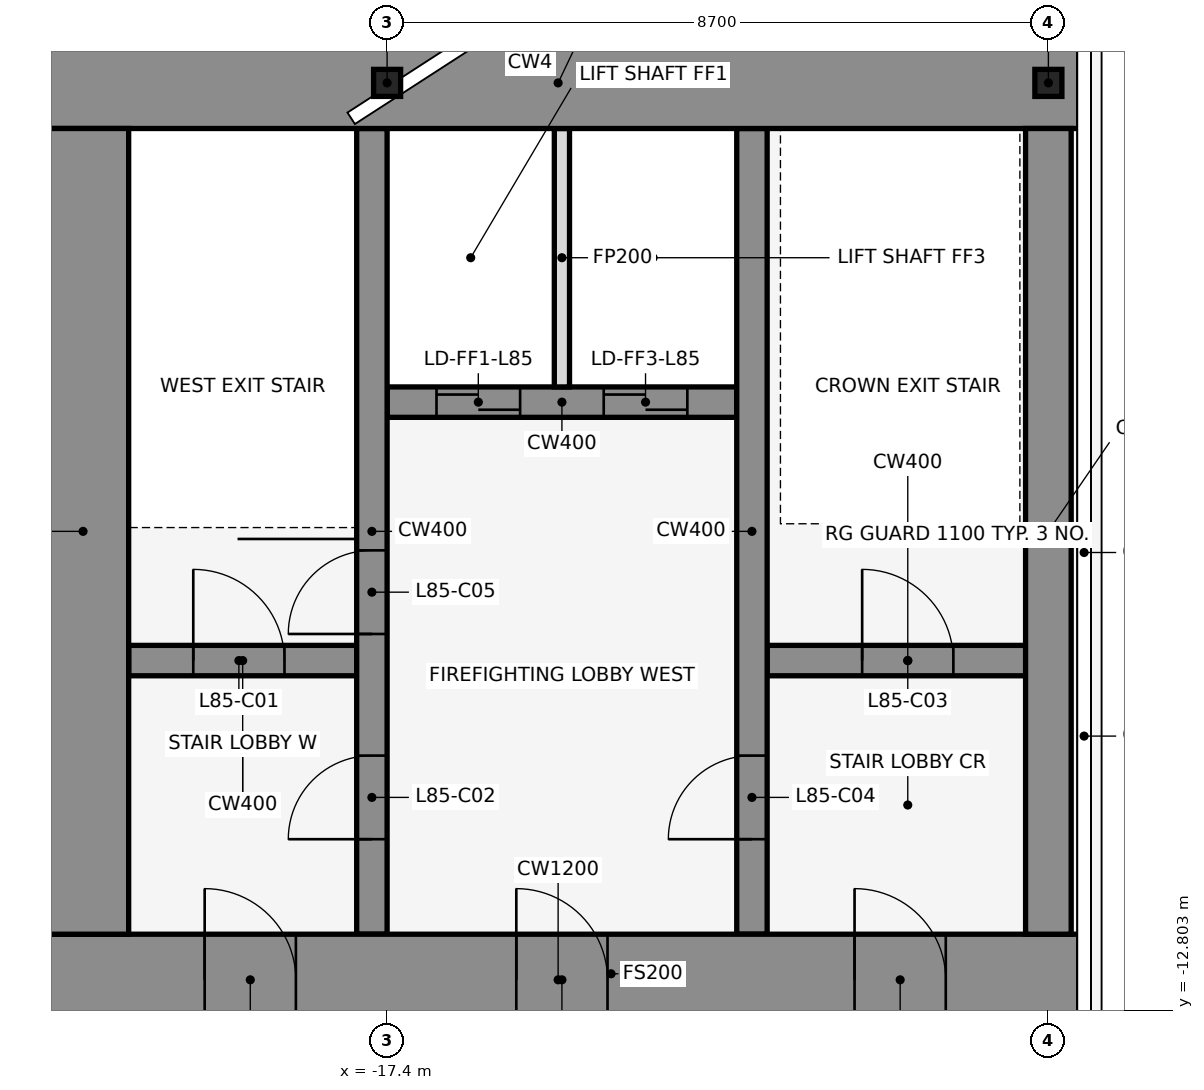
"""IFC4 building model, lengths in metres.
Left out: names, types, materials, properties, quantities, classifications, styles, units other than length and angle.
Written with IfcOpenShell. Run it as: python <this file> out.ifc"""

import sys

from ifc_helpers import new_model, si_unit, direction, frame, frame_2d, origin, origin_2d, place, context, subcontext, project, spatial, rectangle, hollow_rectangle, extrude, element, fill, save


model = new_model("IFC4")
c1 = context("Model", 3, precision=1e-05, world=origin(), true_north=direction((0.0, 1.0)))
c2 = subcontext(c1, "Body", "Model", "MODEL_VIEW")
j1 = project(units=[si_unit("LENGTHUNIT", "METRE"), si_unit("PLANEANGLEUNIT", "RADIAN")], contexts=[c1])
p1 = place(None, origin())
s1 = spatial("IfcSite", under=j1, at=p1, CompositionType="ELEMENT")
p2 = place(p1, origin())
s2 = spatial("IfcBuilding", under=s1, at=p2, CompositionType="ELEMENT")
p3 = place(p2, frame((0.0, 0.0, 379.4)))
s3 = spatial("IfcBuildingStorey", under=s2, at=p3, CompositionType="ELEMENT", Elevation=379.4)
p4 = place(p3, frame((-17.4, -0.6, 4.5), z_axis=(0.0, 0.0, 1.0), x_axis=(1.0, 0.0, 0.0)))
e1 = element("IfcColumn", 1, at=p4, inside=s3, PredefinedType="COLUMN", context=c2, shape_type="SweptSolid", body=[
    extrude(hollow_rectangle(XDim=0.356, YDim=0.356, WallThickness=0.012, at=origin_2d()), origin(), (0.0, 0.0, 1.0), 2.624),
])
p5 = place(p3, frame((-8.7, -0.6, 4.5), z_axis=(0.0, 0.0, 1.0), x_axis=(1.0, 0.0, 0.0)))
e2 = element("IfcColumn", 2, at=p5, inside=s3, PredefinedType="COLUMN", context=c2, shape_type="SweptSolid", body=[
    extrude(hollow_rectangle(XDim=0.356, YDim=0.356, WallThickness=0.012, at=origin_2d()), origin(), (0.0, 0.0, 1.0), 2.816),
])
p6 = place(p3, frame((-20.8, -8.2, 0.0), z_axis=(0.0, 0.0, 1.0), x_axis=(1.0, 0.0, 0.0)))
e3 = element("IfcWall", 3, at=p6, inside=s3, PredefinedType="SHEAR", context=c2, shape_type="SweptSolid", body=[
    extrude(rectangle(XDim=3.0, YDim=0.4, at=frame_2d((1.5, 0.0))), origin(), (0.0, 0.0, 1.0), 4.5),
])
p7 = place(p6, frame((0.85, 0.0, 0.0)))
e4 = element("IfcOpeningElement", 4, at=p7, cuts=e3, PredefinedType="OPENING", context=c2, shape_type="SweptSolid", body=[
    extrude(rectangle(XDim=1.2, YDim=2.1, at=frame_2d((0.6, 1.05))), frame((0.0, 0.212, 0.0), z_axis=(0.0, -1.0, 0.0), x_axis=(1.0, 0.0, 0.0)), (0.0, 0.0, 1.0), 0.424),
])
p8 = place(p3, frame((-12.4, -8.2, 0.0), z_axis=(0.0, 0.0, 1.0), x_axis=(1.0, 0.0, 0.0)))
e5 = element("IfcWall", 5, at=p8, inside=s3, PredefinedType="SHEAR", context=c2, shape_type="SweptSolid", body=[
    extrude(rectangle(XDim=3.7, YDim=0.4, at=frame_2d((1.85, 0.0))), origin(), (0.0, 0.0, 1.0), 4.5),
])
p9 = place(p8, frame((1.25, 0.0, 0.0)))
e6 = element("IfcOpeningElement", 6, at=p9, cuts=e5, PredefinedType="OPENING", context=c2, shape_type="SweptSolid", body=[
    extrude(rectangle(XDim=1.2, YDim=2.1, at=frame_2d((0.6, 1.05))), frame((0.0, 0.212, 0.0), z_axis=(0.0, -1.0, 0.0), x_axis=(1.0, 0.0, 0.0)), (0.0, 0.0, 1.0), 0.424),
])
p10 = place(p3, frame((-17.4, -4.8, 0.0), z_axis=(0.0, 0.0, 1.0), x_axis=(1.0, 0.0, 0.0)))
e7 = element("IfcWall", 7, at=p10, inside=s3, PredefinedType="SHEAR", context=c2, shape_type="SweptSolid", body=[
    extrude(rectangle(XDim=4.6, YDim=0.4, at=frame_2d((2.3, 0.0))), origin(), (0.0, 0.0, 1.0), 4.5),
])
p11 = place(p10, frame((0.65, 0.0, 0.0)))
e8 = element("IfcOpeningElement", 8, at=p11, cuts=e7, PredefinedType="OPENING", context=c2, shape_type="SweptSolid", body=[
    extrude(rectangle(XDim=1.1, YDim=2.1, at=frame_2d((0.55, 1.05))), frame((0.0, 0.212, 0.0), z_axis=(0.0, -1.0, 0.0), x_axis=(1.0, 0.0, 0.0)), (0.0, 0.0, 1.0), 0.424),
])
p12 = place(p10, frame((2.85, 0.0, 0.0)))
e9 = element("IfcOpeningElement", 9, at=p12, cuts=e7, PredefinedType="OPENING", context=c2, shape_type="SweptSolid", body=[
    extrude(rectangle(XDim=1.1, YDim=2.1, at=frame_2d((0.55, 1.05))), frame((0.0, 0.212, 0.0), z_axis=(0.0, -1.0, 0.0), x_axis=(1.0, 0.0, 0.0)), (0.0, 0.0, 1.0), 0.424),
])
p13 = place(p3, frame((-17.6, -11.8, 0.0), z_axis=(0.0, 0.0, 1.0), x_axis=(0.0, 1.0, 0.0)))
e10 = element("IfcWall", 10, at=p13, inside=s3, PredefinedType="SHEAR", context=c2, shape_type="SweptSolid", body=[
    extrude(rectangle(XDim=10.6, YDim=0.4, at=frame_2d((5.3, 0.0))), origin(), (0.0, 0.0, 1.0), 4.5),
])
p14 = place(p13, frame((1.25, 0.0, 0.0)))
e11 = element("IfcOpeningElement", 11, at=p14, cuts=e10, PredefinedType="OPENING", context=c2, shape_type="SweptSolid", body=[
    extrude(rectangle(XDim=1.1, YDim=2.1, at=frame_2d((0.55, 1.05))), frame((0.0, 0.212, 0.0), z_axis=(0.0, -1.0, 0.0), x_axis=(1.0, 0.0, 0.0)), (0.0, 0.0, 1.0), 0.424),
])
p15 = place(p13, frame((3.95, 0.0, 0.0)))
e12 = element("IfcOpeningElement", 12, at=p15, cuts=e10, PredefinedType="OPENING", context=c2, shape_type="SweptSolid", body=[
    extrude(rectangle(XDim=1.1, YDim=2.1, at=frame_2d((0.55, 1.05))), frame((0.0, 0.212, 0.0), z_axis=(0.0, -1.0, 0.0), x_axis=(1.0, 0.0, 0.0)), (0.0, 0.0, 1.0), 0.424),
])
p16 = place(p3, frame((-15.1, -4.6, 0.0), z_axis=(0.0, 0.0, 1.0), x_axis=(0.0, 1.0, 0.0)))
e13 = element("IfcWall", 13, at=p16, inside=s3, PredefinedType="PARTITIONING", context=c2, shape_type="SweptSolid", body=[
    extrude(rectangle(XDim=3.4, YDim=0.2, at=frame_2d((1.7, 0.0))), origin(), (0.0, 0.0, 1.0), 3.78),
])
p17 = place(p3, frame((-12.6, -11.8, 0.0), z_axis=(0.0, 0.0, 1.0), x_axis=(0.0, 1.0, 0.0)))
e14 = element("IfcWall", 14, at=p17, inside=s3, PredefinedType="SHEAR", context=c2, shape_type="SweptSolid", body=[
    extrude(rectangle(XDim=10.6, YDim=0.4, at=frame_2d((5.3, 0.0))), origin(), (0.0, 0.0, 1.0), 4.5),
])
p18 = place(p17, frame((1.25, 0.0, 0.0)))
e15 = element("IfcOpeningElement", 15, at=p18, cuts=e14, PredefinedType="OPENING", context=c2, shape_type="SweptSolid", body=[
    extrude(rectangle(XDim=1.1, YDim=2.1, at=frame_2d((0.55, 1.05))), frame((0.0, 0.212, 0.0), z_axis=(0.0, -1.0, 0.0), x_axis=(1.0, 0.0, 0.0)), (0.0, 0.0, 1.0), 0.424),
])
p19 = place(p3, frame((-22.0, -0.6, 0.0), z_axis=(0.0, 0.0, 1.0), x_axis=(1.0, 0.0, 0.0)))
e16 = element("IfcWall", 16, at=p19, inside=s3, PredefinedType="SHEAR", context=c2, shape_type="SweptSolid", body=[
    extrude(rectangle(XDim=13.7, YDim=1.2, at=frame_2d((6.85, 0.0))), origin(), (0.0, 0.0, 1.0), 4.5),
])
p20 = place(p3, frame((-22.0, -12.4, 0.0), z_axis=(0.0, 0.0, 1.0), x_axis=(1.0, 0.0, 0.0)))
e17 = element("IfcWall", 17, at=p20, inside=s3, PredefinedType="SHEAR", context=c2, shape_type="SweptSolid", body=[
    extrude(rectangle(XDim=13.7, YDim=1.2, at=frame_2d((6.85, 0.0))), origin(), (0.0, 0.0, 1.0), 4.5),
])
p21 = place(p20, frame((2.2, 0.0, 0.0)))
e18 = element("IfcOpeningElement", 18, at=p21, cuts=e17, PredefinedType="OPENING", context=c2, shape_type="SweptSolid", body=[
    extrude(rectangle(XDim=1.2, YDim=2.1, at=frame_2d((0.6, 1.05))), frame((0.0, 0.612, 0.0), z_axis=(0.0, -1.0, 0.0), x_axis=(1.0, 0.0, 0.0)), (0.0, 0.0, 1.0), 1.224),
])
p22 = place(p20, frame((10.75, 0.0, 0.0)))
e19 = element("IfcOpeningElement", 19, at=p22, cuts=e17, PredefinedType="OPENING", context=c2, shape_type="SweptSolid", body=[
    extrude(rectangle(XDim=1.2, YDim=2.1, at=frame_2d((0.6, 1.05))), frame((0.0, 0.612, 0.0), z_axis=(0.0, -1.0, 0.0), x_axis=(1.0, 0.0, 0.0)), (0.0, 0.0, 1.0), 1.224),
])
p23 = place(p20, frame((6.3, 0.0, 0.0)))
e20 = element("IfcOpeningElement", 20, at=p23, cuts=e17, PredefinedType="OPENING", context=c2, shape_type="SweptSolid", body=[
    extrude(rectangle(XDim=1.2, YDim=2.1, at=frame_2d((0.6, 1.05))), frame((0.0, 0.612, 0.0), z_axis=(0.0, -1.0, 0.0), x_axis=(1.0, 0.0, 0.0)), (0.0, 0.0, 1.0), 1.224),
])
p24 = place(p3, frame((-21.4, -11.8, 0.0), z_axis=(0.0, 0.0, 1.0), x_axis=(0.0, 1.0, 0.0)))
e21 = element("IfcWall", 21, at=p24, inside=s3, PredefinedType="SHEAR", context=c2, shape_type="SweptSolid", body=[
    extrude(rectangle(XDim=10.6, YDim=1.2, at=frame_2d((5.3, 0.0))), origin(), (0.0, 0.0, 1.0), 4.5),
])
p25 = place(p3, frame((-8.7, -11.8, 0.0), z_axis=(0.0, 0.0, 1.0), x_axis=(0.0, 1.0, 0.0)))
e22 = element("IfcWall", 22, at=p25, inside=s3, PredefinedType="SHEAR", context=c2, shape_type="SweptSolid", body=[
    extrude(rectangle(XDim=10.6, YDim=0.6, at=frame_2d((5.3, 0.0))), origin(), (0.0, 0.0, 1.0), 4.5),
])
p26 = place(p7, origin())
e23 = element("IfcDoor", 23, at=p26, inside=s3, OperationType="SINGLE_SWING_LEFT", PredefinedType="DOOR", context=c2, shape_type="SweptSolid", body=[
    extrude(rectangle(XDim=1.2, YDim=2.1, at=frame_2d((0.6, 1.05))), frame((0.0, 0.025, 0.0), z_axis=(0.0, -1.0, 0.0), x_axis=(1.0, 0.0, 0.0)), (0.0, 0.0, 1.0), 0.05),
])
fill(e4, e23)
p27 = place(p14, frame((1.1, 0.0, 0.0), z_axis=(0.0, 0.0, 1.0), x_axis=(-1.0, 0.0, 0.0)))
e24 = element("IfcDoor", 24, at=p27, inside=s3, OperationType="SINGLE_SWING_LEFT", PredefinedType="DOOR", context=c2, shape_type="SweptSolid", body=[
    extrude(rectangle(XDim=1.1, YDim=2.1, at=frame_2d((0.55, 1.05))), frame((0.0, 0.025, 0.0), z_axis=(0.0, -1.0, 0.0), x_axis=(1.0, 0.0, 0.0)), (0.0, 0.0, 1.0), 0.05),
])
fill(e11, e24)
p28 = place(p9, origin())
e25 = element("IfcDoor", 25, at=p28, inside=s3, OperationType="SINGLE_SWING_LEFT", PredefinedType="DOOR", context=c2, shape_type="SweptSolid", body=[
    extrude(rectangle(XDim=1.2, YDim=2.1, at=frame_2d((0.6, 1.05))), frame((0.0, 0.025, 0.0), z_axis=(0.0, -1.0, 0.0), x_axis=(1.0, 0.0, 0.0)), (0.0, 0.0, 1.0), 0.05),
])
fill(e6, e25)
p29 = place(p18, origin())
e26 = element("IfcDoor", 26, at=p29, inside=s3, OperationType="SINGLE_SWING_RIGHT", PredefinedType="DOOR", context=c2, shape_type="SweptSolid", body=[
    extrude(rectangle(XDim=1.1, YDim=2.1, at=frame_2d((0.55, 1.05))), frame((0.0, 0.025, 0.0), z_axis=(0.0, -1.0, 0.0), x_axis=(1.0, 0.0, 0.0)), (0.0, 0.0, 1.0), 0.05),
])
fill(e15, e26)
p30 = place(p11, origin())
e27 = element("IfcDoor", 27, at=p30, inside=s3, OperationType="DOUBLE_DOOR_SLIDING", PredefinedType="DOOR", context=c2, shape_type="SweptSolid", body=[
    extrude(rectangle(XDim=1.1, YDim=2.1, at=frame_2d((0.55, 1.05))), frame((0.0, 0.025, 0.0), z_axis=(0.0, -1.0, 0.0), x_axis=(1.0, 0.0, 0.0)), (0.0, 0.0, 1.0), 0.05),
])
fill(e8, e27)
p31 = place(p12, origin())
e28 = element("IfcDoor", 28, at=p31, inside=s3, OperationType="DOUBLE_DOOR_SLIDING", PredefinedType="DOOR", context=c2, shape_type="SweptSolid", body=[
    extrude(rectangle(XDim=1.1, YDim=2.1, at=frame_2d((0.55, 1.05))), frame((0.0, 0.025, 0.0), z_axis=(0.0, -1.0, 0.0), x_axis=(1.0, 0.0, 0.0)), (0.0, 0.0, 1.0), 0.05),
])
fill(e9, e28)
p32 = place(p15, frame((1.1, 0.0, 0.0), z_axis=(0.0, 0.0, 1.0), x_axis=(-1.0, 0.0, 0.0)))
e29 = element("IfcDoor", 29, at=p32, inside=s3, OperationType="SINGLE_SWING_RIGHT", PredefinedType="DOOR", context=c2, shape_type="SweptSolid", body=[
    extrude(rectangle(XDim=1.1, YDim=2.1, at=frame_2d((0.55, 1.05))), frame((0.0, 0.025, 0.0), z_axis=(0.0, -1.0, 0.0), x_axis=(1.0, 0.0, 0.0)), (0.0, 0.0, 1.0), 0.05),
])
fill(e12, e29)
p33 = place(p21, frame((1.2, 0.0, 0.0), z_axis=(0.0, 0.0, 1.0), x_axis=(-1.0, 0.0, 0.0)))
e30 = element("IfcDoor", 30, at=p33, inside=s3, OperationType="SINGLE_SWING_RIGHT", PredefinedType="DOOR", context=c2, shape_type="SweptSolid", body=[
    extrude(rectangle(XDim=1.2, YDim=2.1, at=frame_2d((0.6, 1.05))), frame((0.0, 0.025, 0.0), z_axis=(0.0, -1.0, 0.0), x_axis=(1.0, 0.0, 0.0)), (0.0, 0.0, 1.0), 0.05),
])
fill(e18, e30)
p34 = place(p22, frame((1.2, 0.0, 0.0), z_axis=(0.0, 0.0, 1.0), x_axis=(-1.0, 0.0, 0.0)))
e31 = element("IfcDoor", 31, at=p34, inside=s3, OperationType="SINGLE_SWING_RIGHT", PredefinedType="DOOR", context=c2, shape_type="SweptSolid", body=[
    extrude(rectangle(XDim=1.2, YDim=2.1, at=frame_2d((0.6, 1.05))), frame((0.0, 0.025, 0.0), z_axis=(0.0, -1.0, 0.0), x_axis=(1.0, 0.0, 0.0)), (0.0, 0.0, 1.0), 0.05),
])
fill(e19, e31)
p35 = place(p23, frame((1.2, 0.0, 0.0), z_axis=(0.0, 0.0, 1.0), x_axis=(-1.0, 0.0, 0.0)))
e32 = element("IfcDoor", 32, at=p35, inside=s3, OperationType="SINGLE_SWING_RIGHT", PredefinedType="DOOR", context=c2, shape_type="SweptSolid", body=[
    extrude(rectangle(XDim=1.2, YDim=2.1, at=frame_2d((0.6, 1.05))), frame((0.0, 0.025, 0.0), z_axis=(0.0, -1.0, 0.0), x_axis=(1.0, 0.0, 0.0)), (0.0, 0.0, 1.0), 0.05),
])
fill(e20, e32)
save(model, sys.argv[1])
